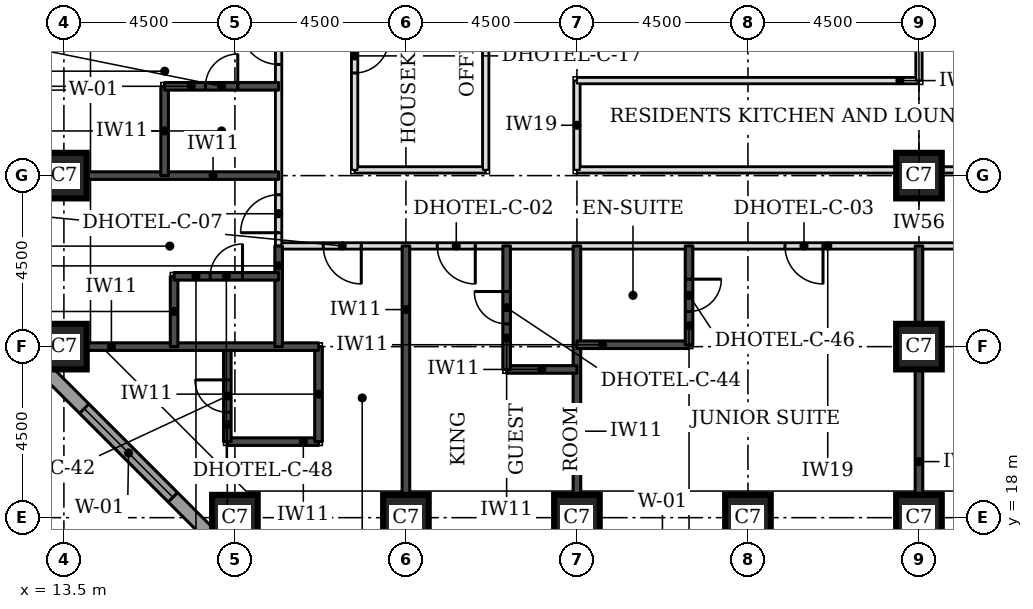
"""IFC4 building model, lengths in metres.
Left out: names, types, materials, properties, quantities, classifications, styles, units other than length and angle.
Written with IfcOpenShell. Run it as: python <this file> out.ifc"""

import sys

from ifc_helpers import new_model, si_unit, direction, frame, frame_2d, origin, origin_2d, place, context, subcontext, project, spatial, rectangle, extrude, element, fill, save


model = new_model("IFC4")
c1 = context("Model", 3, precision=1e-05, world=origin(), true_north=direction((0.0, 1.0)))
c2 = subcontext(c1, "Body", "Model", "MODEL_VIEW")
j1 = project(units=[si_unit("LENGTHUNIT", "METRE"), si_unit("PLANEANGLEUNIT", "RADIAN")], contexts=[c1])
p1 = place(None, origin())
s1 = spatial("IfcSite", under=j1, at=p1, CompositionType="ELEMENT")
p2 = place(p1, origin())
s2 = spatial("IfcBuilding", under=s1, at=p2, CompositionType="ELEMENT")
p3 = place(p2, frame((0.0, 0.0, 56.1)))
s3 = spatial("IfcBuildingStorey", under=s2, at=p3, CompositionType="ELEMENT", Elevation=56.1)
for number, where, z_axis, x_axis in (
    (1, (18.0, 18.0, 0.0), (0.0, 0.0, 1.0), (1.0, 0.0, 0.0)),
    (2, (22.5, 18.0, 0.0), (0.0, 0.0, 1.0), (1.0, 0.0, 0.0)),
    (3, (27.0, 18.0, 0.0), (0.0, 0.0, 1.0), (1.0, 0.0, 0.0)),
    (4, (31.5, 18.0, 0.0), (0.0, 0.0, 1.0), (1.0, 0.0, 0.0)),
    (5, (36.0, 18.0, 0.0), (0.0, 0.0, 1.0), (1.0, 0.0, 0.0)),
    (6, (13.5, 22.5, 0.0), (0.0, 0.0, 1.0), (1.0, 0.0, 0.0)),
    (7, (36.0, 22.5, 0.0), (0.0, 0.0, 1.0), (1.0, 0.0, 0.0)),
    (8, (13.5, 27.0, 0.0), (0.0, 0.0, 1.0), (1.0, 0.0, 0.0)),
    (9, (36.0, 27.0, 0.0), (0.0, 0.0, 1.0), (1.0, 0.0, 0.0)),
):
    element("IfcColumn", number, at=place(p3, frame(where, z_axis=z_axis, x_axis=x_axis)), inside=s3, PredefinedType="COLUMN", context=c2, shape_type="SweptSolid", body=[
        extrude(rectangle(XDim=1.2, YDim=1.2, at=origin_2d()), origin(), (0.0, 0.0, 1.0), 3.3),
    ])
p4 = place(p3, frame((12.674, 22.23, 0.0), z_axis=(0.0, 0.0, 1.0), x_axis=(0.707106781187, -0.707106781187, 0.0)))
e10 = element("IfcWall", 10, at=p4, inside=s3, PredefinedType="STANDARD", context=c2, shape_type="SweptSolid", body=[
    extrude(rectangle(XDim=7.151, YDim=0.35, at=frame_2d((3.576, 0.0))), origin(), (0.0, 0.0, 1.0), 3.055),
])
p5 = place(p4, frame((1.926, 0.0, 0.8)))
e11 = element("IfcOpeningElement", 11, at=p5, cuts=e10, PredefinedType="OPENING", context=c2, shape_type="SweptSolid", body=[
    extrude(rectangle(XDim=3.3, YDim=1.5, at=frame_2d((1.65, 0.75))), frame((0.0, 0.185, 0.0), z_axis=(0.0, -1.0, 0.0), x_axis=(1.0, 0.0, 0.0)), (0.0, 0.0, 1.0), 0.37),
])
p6 = place(p3, frame((19.15, 25.15, 0.0), z_axis=(0.0, 0.0, 1.0), x_axis=(1.0, 0.0, 0.0)))
e12 = element("IfcWall", 12, at=p6, inside=s3, PredefinedType="PARTITIONING", context=c2, shape_type="SweptSolid", body=[
    extrude(rectangle(XDim=33.7, YDim=0.15, at=frame_2d((16.85, 0.0))), origin(), (0.0, 0.0, 1.0), 3.08),
])
p7 = place(p6, frame((4.175, 0.0, 0.0)))
e13 = element("IfcOpeningElement", 13, at=p7, cuts=e12, PredefinedType="OPENING", context=c2, shape_type="SweptSolid", body=[
    extrude(rectangle(XDim=1.0, YDim=2.1, at=frame_2d((0.5, 1.05))), frame((0.0, 0.085, 0.0), z_axis=(0.0, -1.0, 0.0), x_axis=(1.0, 0.0, 0.0)), (0.0, 0.0, 1.0), 0.17),
])
p8 = place(p6, frame((13.325, 0.0, 0.0)))
e14 = element("IfcOpeningElement", 14, at=p8, cuts=e12, PredefinedType="OPENING", context=c2, shape_type="SweptSolid", body=[
    extrude(rectangle(XDim=1.0, YDim=2.1, at=frame_2d((0.5, 1.05))), frame((0.0, 0.085, 0.0), z_axis=(0.0, -1.0, 0.0), x_axis=(1.0, 0.0, 0.0)), (0.0, 0.0, 1.0), 0.17),
])
p9 = place(p6, frame((19.625, 0.0, 0.0)))
e15 = element("IfcOpeningElement", 15, at=p9, cuts=e12, PredefinedType="OPENING", context=c2, shape_type="SweptSolid", body=[
    extrude(rectangle(XDim=1.0, YDim=2.1, at=frame_2d((0.5, 1.05))), frame((0.0, 0.085, 0.0), z_axis=(0.0, -1.0, 0.0), x_axis=(1.0, 0.0, 0.0)), (0.0, 0.0, 1.0), 0.17),
])
p10 = place(p6, frame((28.775, 0.0, 0.0)))
e16 = element("IfcOpeningElement", 16, at=p10, cuts=e12, PredefinedType="OPENING", context=c2, shape_type="SweptSolid", body=[
    extrude(rectangle(XDim=1.0, YDim=2.1, at=frame_2d((0.5, 1.05))), frame((0.0, 0.085, 0.0), z_axis=(0.0, -1.0, 0.0), x_axis=(1.0, 0.0, 0.0)), (0.0, 0.0, 1.0), 0.17),
])
p11 = place(p6, frame((1.175, 0.0, 0.0)))
e17 = element("IfcOpeningElement", 17, at=p11, cuts=e12, PredefinedType="OPENING", context=c2, shape_type="SweptSolid", body=[
    extrude(rectangle(XDim=1.0, YDim=2.1, at=frame_2d((0.5, 1.05))), frame((0.0, 0.085, 0.0), z_axis=(0.0, -1.0, 0.0), x_axis=(1.0, 0.0, 0.0)), (0.0, 0.0, 1.0), 0.17),
])
p12 = place(p6, frame((31.525, 0.0, 0.0)))
e18 = element("IfcOpeningElement", 18, at=p12, cuts=e12, PredefinedType="OPENING", context=c2, shape_type="SweptSolid", body=[
    extrude(rectangle(XDim=1.0, YDim=2.1, at=frame_2d((0.5, 1.05))), frame((0.0, 0.085, 0.0), z_axis=(0.0, -1.0, 0.0), x_axis=(1.0, 0.0, 0.0)), (0.0, 0.0, 1.0), 0.17),
])
p13 = place(p3, frame((19.15, 25.15, 0.0), z_axis=(0.0, 0.0, 1.0), x_axis=(0.0, 1.0, 0.0)))
e19 = element("IfcWall", 19, at=p13, inside=s3, PredefinedType="PARTITIONING", context=c2, shape_type="SweptSolid", body=[
    extrude(rectangle(XDim=24.35, YDim=0.15, at=frame_2d((12.175, 0.0))), origin(), (0.0, 0.0, 1.0), 3.08),
])
p14 = place(p13, frame((0.347, 0.0, 0.0)))
e20 = element("IfcOpeningElement", 20, at=p14, cuts=e19, PredefinedType="OPENING", context=c2, shape_type="SweptSolid", body=[
    extrude(rectangle(XDim=1.0, YDim=2.1, at=frame_2d((0.5, 1.05))), frame((0.0, 0.085, 0.0), z_axis=(0.0, -1.0, 0.0), x_axis=(1.0, 0.0, 0.0)), (0.0, 0.0, 1.0), 0.17),
])
p15 = place(p13, frame((4.775, 0.0, 0.0)))
e21 = element("IfcOpeningElement", 21, at=p15, cuts=e19, PredefinedType="OPENING", context=c2, shape_type="SweptSolid", body=[
    extrude(rectangle(XDim=1.0, YDim=2.1, at=frame_2d((0.5, 1.05))), frame((0.0, 0.085, 0.0), z_axis=(0.0, -1.0, 0.0), x_axis=(1.0, 0.0, 0.0)), (0.0, 0.0, 1.0), 0.17),
])
p16 = place(p13, frame((7.175, 0.0, 0.0)))
e22 = element("IfcOpeningElement", 22, at=p16, cuts=e19, PredefinedType="OPENING", context=c2, shape_type="SweptSolid", body=[
    extrude(rectangle(XDim=1.0, YDim=2.1, at=frame_2d((0.5, 1.05))), frame((0.0, 0.085, 0.0), z_axis=(0.0, -1.0, 0.0), x_axis=(1.0, 0.0, 0.0)), (0.0, 0.0, 1.0), 0.17),
])
p17 = place(p13, frame((13.75, 0.0, 0.0)))
e23 = element("IfcOpeningElement", 23, at=p17, cuts=e19, PredefinedType="OPENING", context=c2, shape_type="SweptSolid", body=[
    extrude(rectangle(XDim=1.0, YDim=2.1, at=frame_2d((0.5, 1.05))), frame((0.0, 0.085, 0.0), z_axis=(0.0, -1.0, 0.0), x_axis=(1.0, 0.0, 0.0)), (0.0, 0.0, 1.0), 0.17),
])
p18 = place(p13, frame((16.175, 0.0, 0.0)))
e24 = element("IfcOpeningElement", 24, at=p18, cuts=e19, PredefinedType="OPENING", context=c2, shape_type="SweptSolid", body=[
    extrude(rectangle(XDim=1.0, YDim=2.1, at=frame_2d((0.5, 1.05))), frame((0.0, 0.085, 0.0), z_axis=(0.0, -1.0, 0.0), x_axis=(1.0, 0.0, 0.0)), (0.0, 0.0, 1.0), 0.17),
])
p19 = place(p13, frame((22.775, 0.0, 0.0)))
e25 = element("IfcOpeningElement", 25, at=p19, cuts=e19, PredefinedType="OPENING", context=c2, shape_type="SweptSolid", body=[
    extrude(rectangle(XDim=1.0, YDim=2.1, at=frame_2d((0.5, 1.05))), frame((0.0, 0.085, 0.0), z_axis=(0.0, -1.0, 0.0), x_axis=(1.0, 0.0, 0.0)), (0.0, 0.0, 1.0), 0.17),
])
p20 = place(p3, frame((21.15, 27.15, 0.0), z_axis=(0.0, 0.0, 1.0), x_axis=(1.0, 0.0, 0.0)))
e26 = element("IfcWall", 26, at=p20, inside=s3, PredefinedType="PARTITIONING", context=c2, shape_type="SweptSolid", body=[
    extrude(rectangle(XDim=3.45, YDim=0.15, at=frame_2d((1.725, 0.0))), origin(), (0.0, 0.0, 1.0), 3.08),
])
p21 = place(p3, frame((21.15, 27.15, 0.0), z_axis=(0.0, 0.0, 1.0), x_axis=(0.0, 1.0, 0.0)))
e27 = element("IfcWall", 27, at=p21, inside=s3, PredefinedType="PARTITIONING", context=c2, shape_type="SweptSolid", body=[
    extrude(rectangle(XDim=15.85, YDim=0.15, at=frame_2d((7.925, 0.0))), origin(), (0.0, 0.0, 1.0), 3.08),
])
p22 = place(p21, frame((2.55, 0.0, 0.0)))
e28 = element("IfcOpeningElement", 28, at=p22, cuts=e27, PredefinedType="OPENING", context=c2, shape_type="SweptSolid", body=[
    extrude(rectangle(XDim=0.9, YDim=2.1, at=frame_2d((0.45, 1.05))), frame((0.0, 0.085, 0.0), z_axis=(0.0, -1.0, 0.0), x_axis=(1.0, 0.0, 0.0)), (0.0, 0.0, 1.0), 0.17),
])
p23 = place(p21, frame((9.225, 0.0, 0.0)))
e29 = element("IfcOpeningElement", 29, at=p23, cuts=e27, PredefinedType="OPENING", context=c2, shape_type="SweptSolid", body=[
    extrude(rectangle(XDim=0.9, YDim=2.1, at=frame_2d((0.45, 1.05))), frame((0.0, 0.085, 0.0), z_axis=(0.0, -1.0, 0.0), x_axis=(1.0, 0.0, 0.0)), (0.0, 0.0, 1.0), 0.17),
])
p24 = place(p3, frame((24.6, 27.15, 0.0), z_axis=(0.0, 0.0, 1.0), x_axis=(0.0, 1.0, 0.0)))
e30 = element("IfcWall", 30, at=p24, inside=s3, PredefinedType="PARTITIONING", context=c2, shape_type="SweptSolid", body=[
    extrude(rectangle(XDim=13.35, YDim=0.15, at=frame_2d((6.675, 0.0))), origin(), (0.0, 0.0, 1.0), 3.08),
])
p25 = place(p3, frame((27.0, 27.15, 0.0), z_axis=(0.0, 0.0, 1.0), x_axis=(1.0, 0.0, 0.0)))
e31 = element("IfcWall", 31, at=p25, inside=s3, PredefinedType="PARTITIONING", context=c2, shape_type="SweptSolid", body=[
    extrude(rectangle(XDim=11.5, YDim=0.15, at=frame_2d((5.75, 0.0))), origin(), (0.0, 0.0, 1.0), 3.08),
])
p26 = place(p3, frame((27.0, 27.15, 0.0), z_axis=(0.0, 0.0, 1.0), x_axis=(0.0, 1.0, 0.0)))
e32 = element("IfcWall", 32, at=p26, inside=s3, PredefinedType="PARTITIONING", context=c2, shape_type="SweptSolid", body=[
    extrude(rectangle(XDim=2.35, YDim=0.15, at=frame_2d((1.175, 0.0))), origin(), (0.0, 0.0, 1.0), 3.08),
])
p27 = place(p3, frame((27.0, 29.5, 0.0), z_axis=(0.0, 0.0, 1.0), x_axis=(1.0, 0.0, 0.0)))
e33 = element("IfcWall", 33, at=p27, inside=s3, PredefinedType="PARTITIONING", context=c2, shape_type="SweptSolid", body=[
    extrude(rectangle(XDim=9.0, YDim=0.15, at=frame_2d((4.5, 0.0))), origin(), (0.0, 0.0, 1.0), 3.08),
])
p28 = place(p3, frame((36.0, 29.5, 0.0), z_axis=(0.0, 0.0, 1.0), x_axis=(0.0, 1.0, 0.0)))
e34 = element("IfcWall", 34, at=p28, inside=s3, PredefinedType="PARTITIONING", context=c2, shape_type="SweptSolid", body=[
    extrude(rectangle(XDim=1.95, YDim=0.15, at=frame_2d((0.975, 0.0))), origin(), (0.0, 0.0, 1.0), 2.33),
])
for number, where, z_axis, x_axis in (
    (35, (22.5, 18.6, 0.0), (0.0, 0.0, 1.0), (0.0, 1.0, 0.0)),
    (36, (27.0, 18.6, 0.0), (0.0, 0.0, 1.0), (0.0, 1.0, 0.0)),
    (37, (36.0, 18.6, 0.0), (0.0, 0.0, 1.0), (0.0, 1.0, 0.0)),
):
    element("IfcWall", number, at=place(p3, frame(where, z_axis=z_axis, x_axis=x_axis)), inside=s3, PredefinedType="SOLIDWALL", context=c2, shape_type="SweptSolid", body=[
        extrude(rectangle(XDim=6.55, YDim=0.2, at=frame_2d((3.275, 0.0))), origin(), (0.0, 0.0, 1.0), 3.08),
    ])
p29 = place(p3, frame((17.8, 20.0, 0.0), z_axis=(0.0, 0.0, 1.0), x_axis=(1.0, 0.0, 0.0)))
e38 = element("IfcWall", 38, at=p29, inside=s3, PredefinedType="SOLIDWALL", context=c2, shape_type="SweptSolid", body=[
    extrude(rectangle(XDim=2.4, YDim=0.2, at=frame_2d((1.2, 0.0))), origin(), (0.0, 0.0, 1.0), 3.08),
])
p30 = place(p3, frame((17.8, 20.0, 0.0), z_axis=(0.0, 0.0, 1.0), x_axis=(0.0, 1.0, 0.0)))
e39 = element("IfcWall", 39, at=p30, inside=s3, PredefinedType="SOLIDWALL", context=c2, shape_type="SweptSolid", body=[
    extrude(rectangle(XDim=2.5, YDim=0.2, at=frame_2d((1.25, 0.0))), origin(), (0.0, 0.0, 1.0), 3.08),
])
p31 = place(p30, frame((0.775, 0.0, 0.0)))
e40 = element("IfcOpeningElement", 40, at=p31, cuts=e39, PredefinedType="OPENING", context=c2, shape_type="SweptSolid", body=[
    extrude(rectangle(XDim=0.85, YDim=2.1, at=frame_2d((0.425, 1.05))), frame((0.0, 0.11, 0.0), z_axis=(0.0, -1.0, 0.0), x_axis=(1.0, 0.0, 0.0)), (0.0, 0.0, 1.0), 0.22),
])
p32 = place(p3, frame((20.2, 20.0, 0.0), z_axis=(0.0, 0.0, 1.0), x_axis=(0.0, 1.0, 0.0)))
e41 = element("IfcWall", 41, at=p32, inside=s3, PredefinedType="SOLIDWALL", context=c2, shape_type="SweptSolid", body=[
    extrude(rectangle(XDim=2.5, YDim=0.2, at=frame_2d((1.25, 0.0))), origin(), (0.0, 0.0, 1.0), 3.08),
])
p33 = place(p3, frame((25.15, 21.9, 0.0), z_axis=(0.0, 0.0, 1.0), x_axis=(1.0, 0.0, 0.0)))
e42 = element("IfcWall", 42, at=p33, inside=s3, PredefinedType="SOLIDWALL", context=c2, shape_type="SweptSolid", body=[
    extrude(rectangle(XDim=1.85, YDim=0.2, at=frame_2d((0.925, 0.0))), origin(), (0.0, 0.0, 1.0), 3.08),
])
p34 = place(p3, frame((25.15, 21.9, 0.0), z_axis=(0.0, 0.0, 1.0), x_axis=(0.0, 1.0, 0.0)))
e43 = element("IfcWall", 43, at=p34, inside=s3, PredefinedType="SOLIDWALL", context=c2, shape_type="SweptSolid", body=[
    extrude(rectangle(XDim=3.25, YDim=0.2, at=frame_2d((1.625, 0.0))), origin(), (0.0, 0.0, 1.0), 3.08),
])
p35 = place(p34, frame((1.2, 0.0, 0.0)))
e44 = element("IfcOpeningElement", 44, at=p35, cuts=e43, PredefinedType="OPENING", context=c2, shape_type="SweptSolid", body=[
    extrude(rectangle(XDim=0.85, YDim=2.1, at=frame_2d((0.425, 1.05))), frame((0.0, 0.11, 0.0), z_axis=(0.0, -1.0, 0.0), x_axis=(1.0, 0.0, 0.0)), (0.0, 0.0, 1.0), 0.22),
])
p36 = place(p3, frame((14.1, 22.5, 0.0), z_axis=(0.0, 0.0, 1.0), x_axis=(1.0, 0.0, 0.0)))
e45 = element("IfcWall", 45, at=p36, inside=s3, PredefinedType="SOLIDWALL", context=c2, shape_type="SweptSolid", body=[
    extrude(rectangle(XDim=6.1, YDim=0.2, at=frame_2d((3.05, 0.0))), origin(), (0.0, 0.0, 1.0), 3.08),
])
p37 = place(p3, frame((16.4, 22.5, 0.0), z_axis=(0.0, 0.0, 1.0), x_axis=(0.0, 1.0, 0.0)))
e46 = element("IfcWall", 46, at=p37, inside=s3, PredefinedType="SOLIDWALL", context=c2, shape_type="SweptSolid", body=[
    extrude(rectangle(XDim=1.85, YDim=0.2, at=frame_2d((0.925, 0.0))), origin(), (0.0, 0.0, 1.0), 3.08),
])
p38 = place(p3, frame((19.15, 22.5, 0.0), z_axis=(0.0, 0.0, 1.0), x_axis=(0.0, 1.0, 0.0)))
e47 = element("IfcWall", 47, at=p38, inside=s3, PredefinedType="SOLIDWALL", context=c2, shape_type="SweptSolid", body=[
    extrude(rectangle(XDim=2.65, YDim=0.2, at=frame_2d((1.325, 0.0))), origin(), (0.0, 0.0, 1.0), 3.08),
])
p39 = place(p3, frame((27.0, 22.55, 0.0), z_axis=(0.0, 0.0, 1.0), x_axis=(1.0, 0.0, 0.0)))
e48 = element("IfcWall", 48, at=p39, inside=s3, PredefinedType="SOLIDWALL", context=c2, shape_type="SweptSolid", body=[
    extrude(rectangle(XDim=2.95, YDim=0.2, at=frame_2d((1.475, 0.0))), origin(), (0.0, 0.0, 1.0), 3.08),
])
p40 = place(p3, frame((29.95, 22.55, 0.0), z_axis=(0.0, 0.0, 1.0), x_axis=(0.0, 1.0, 0.0)))
e49 = element("IfcWall", 49, at=p40, inside=s3, PredefinedType="SOLIDWALL", context=c2, shape_type="SweptSolid", body=[
    extrude(rectangle(XDim=2.6, YDim=0.2, at=frame_2d((1.3, 0.0))), origin(), (0.0, 0.0, 1.0), 3.08),
])
p41 = place(p40, frame((0.875, 0.0, 0.0)))
e50 = element("IfcOpeningElement", 50, at=p41, cuts=e49, PredefinedType="OPENING", context=c2, shape_type="SweptSolid", body=[
    extrude(rectangle(XDim=0.85, YDim=2.1, at=frame_2d((0.425, 1.05))), frame((0.0, 0.11, 0.0), z_axis=(0.0, -1.0, 0.0), x_axis=(1.0, 0.0, 0.0)), (0.0, 0.0, 1.0), 0.22),
])
p42 = place(p3, frame((16.4, 24.35, 0.0), z_axis=(0.0, 0.0, 1.0), x_axis=(1.0, 0.0, 0.0)))
e51 = element("IfcWall", 51, at=p42, inside=s3, PredefinedType="SOLIDWALL", context=c2, shape_type="SweptSolid", body=[
    extrude(rectangle(XDim=2.75, YDim=0.2, at=frame_2d((1.375, 0.0))), origin(), (0.0, 0.0, 1.0), 3.08),
])
p43 = place(p42, frame((0.95, 0.0, 0.0)))
e52 = element("IfcOpeningElement", 52, at=p43, cuts=e51, PredefinedType="OPENING", context=c2, shape_type="SweptSolid", body=[
    extrude(rectangle(XDim=0.85, YDim=2.1, at=frame_2d((0.425, 1.05))), frame((0.0, 0.11, 0.0), z_axis=(0.0, -1.0, 0.0), x_axis=(1.0, 0.0, 0.0)), (0.0, 0.0, 1.0), 0.22),
])
p44 = place(p3, frame((14.1, 27.0, 0.0), z_axis=(0.0, 0.0, 1.0), x_axis=(1.0, 0.0, 0.0)))
e53 = element("IfcWall", 53, at=p44, inside=s3, PredefinedType="SOLIDWALL", context=c2, shape_type="SweptSolid", body=[
    extrude(rectangle(XDim=5.05, YDim=0.2, at=frame_2d((2.525, 0.0))), origin(), (0.0, 0.0, 1.0), 3.08),
])
p45 = place(p3, frame((16.15, 27.0, 0.0), z_axis=(0.0, 0.0, 1.0), x_axis=(0.0, 1.0, 0.0)))
e54 = element("IfcWall", 54, at=p45, inside=s3, PredefinedType="SOLIDWALL", context=c2, shape_type="SweptSolid", body=[
    extrude(rectangle(XDim=2.35, YDim=0.2, at=frame_2d((1.175, 0.0))), origin(), (0.0, 0.0, 1.0), 3.08),
])
p46 = place(p3, frame((16.15, 29.35, 0.0), z_axis=(0.0, 0.0, 1.0), x_axis=(1.0, 0.0, 0.0)))
e55 = element("IfcWall", 55, at=p46, inside=s3, PredefinedType="SOLIDWALL", context=c2, shape_type="SweptSolid", body=[
    extrude(rectangle(XDim=3.0, YDim=0.2, at=frame_2d((1.5, 0.0))), origin(), (0.0, 0.0, 1.0), 3.08),
])
p47 = place(p46, frame((1.075, 0.0, 0.0)))
e56 = element("IfcOpeningElement", 56, at=p47, cuts=e55, PredefinedType="OPENING", context=c2, shape_type="SweptSolid", body=[
    extrude(rectangle(XDim=0.85, YDim=2.1, at=frame_2d((0.425, 1.05))), frame((0.0, 0.11, 0.0), z_axis=(0.0, -1.0, 0.0), x_axis=(1.0, 0.0, 0.0)), (0.0, 0.0, 1.0), 0.22),
])
p48 = place(p5, origin())
e57 = element("IfcWindow", 57, at=p48, inside=s3, PartitioningType="SINGLE_PANEL", PredefinedType="WINDOW", context=c2, shape_type="SweptSolid", body=[
    extrude(rectangle(XDim=3.3, YDim=1.5, at=frame_2d((1.65, 0.75))), frame((0.0, 0.085, 0.0), z_axis=(0.0, -1.0, 0.0), x_axis=(1.0, 0.0, 0.0)), (0.0, 0.0, 1.0), 0.06),
])
fill(e11, e57)
p49 = place(p7, frame((1.0, 0.0, 0.0), z_axis=(0.0, 0.0, 1.0), x_axis=(-1.0, 0.0, 0.0)))
e58 = element("IfcDoor", 58, at=p49, inside=s3, OperationType="SINGLE_SWING_LEFT", PredefinedType="DOOR", context=c2, shape_type="SweptSolid", body=[
    extrude(rectangle(XDim=1.0, YDim=2.1, at=frame_2d((0.5, 1.05))), frame((0.0, 0.025, 0.0), z_axis=(0.0, -1.0, 0.0), x_axis=(1.0, 0.0, 0.0)), (0.0, 0.0, 1.0), 0.05),
])
fill(e13, e58)
p50 = place(p35, origin())
e59 = element("IfcDoor", 59, at=p50, inside=s3, OperationType="SINGLE_SWING_RIGHT", PredefinedType="DOOR", context=c2, shape_type="SweptSolid", body=[
    extrude(rectangle(XDim=0.85, YDim=2.1, at=frame_2d((0.425, 1.05))), frame((0.0, 0.025, 0.0), z_axis=(0.0, -1.0, 0.0), x_axis=(1.0, 0.0, 0.0)), (0.0, 0.0, 1.0), 0.05),
])
fill(e44, e59)
p51 = place(p8, frame((1.0, 0.0, 0.0), z_axis=(0.0, 0.0, 1.0), x_axis=(-1.0, 0.0, 0.0)))
e60 = element("IfcDoor", 60, at=p51, inside=s3, OperationType="SINGLE_SWING_LEFT", PredefinedType="DOOR", context=c2, shape_type="SweptSolid", body=[
    extrude(rectangle(XDim=1.0, YDim=2.1, at=frame_2d((0.5, 1.05))), frame((0.0, 0.025, 0.0), z_axis=(0.0, -1.0, 0.0), x_axis=(1.0, 0.0, 0.0)), (0.0, 0.0, 1.0), 0.05),
])
fill(e14, e60)
p52 = place(p41, frame((0.85, 0.0, 0.0), z_axis=(0.0, 0.0, 1.0), x_axis=(-1.0, 0.0, 0.0)))
e61 = element("IfcDoor", 61, at=p52, inside=s3, OperationType="SINGLE_SWING_LEFT", PredefinedType="DOOR", context=c2, shape_type="SweptSolid", body=[
    extrude(rectangle(XDim=0.85, YDim=2.1, at=frame_2d((0.425, 1.05))), frame((0.0, 0.025, 0.0), z_axis=(0.0, -1.0, 0.0), x_axis=(1.0, 0.0, 0.0)), (0.0, 0.0, 1.0), 0.05),
])
fill(e50, e61)
p53 = place(p14, origin())
e62 = element("IfcDoor", 62, at=p53, inside=s3, OperationType="SINGLE_SWING_LEFT", PredefinedType="DOOR", context=c2, shape_type="SweptSolid", body=[
    extrude(rectangle(XDim=1.0, YDim=2.1, at=frame_2d((0.5, 1.05))), frame((0.0, 0.025, 0.0), z_axis=(0.0, -1.0, 0.0), x_axis=(1.0, 0.0, 0.0)), (0.0, 0.0, 1.0), 0.05),
])
fill(e20, e62)
p54 = place(p43, origin())
e63 = element("IfcDoor", 63, at=p54, inside=s3, OperationType="SINGLE_SWING_RIGHT", PredefinedType="DOOR", context=c2, shape_type="SweptSolid", body=[
    extrude(rectangle(XDim=0.85, YDim=2.1, at=frame_2d((0.425, 1.05))), frame((0.0, 0.025, 0.0), z_axis=(0.0, -1.0, 0.0), x_axis=(1.0, 0.0, 0.0)), (0.0, 0.0, 1.0), 0.05),
])
fill(e52, e63)
p55 = place(p15, origin())
e64 = element("IfcDoor", 64, at=p55, inside=s3, OperationType="SINGLE_SWING_RIGHT", PredefinedType="DOOR", context=c2, shape_type="SweptSolid", body=[
    extrude(rectangle(XDim=1.0, YDim=2.1, at=frame_2d((0.5, 1.05))), frame((0.0, 0.025, 0.0), z_axis=(0.0, -1.0, 0.0), x_axis=(1.0, 0.0, 0.0)), (0.0, 0.0, 1.0), 0.05),
])
fill(e21, e64)
p56 = place(p47, origin())
e65 = element("IfcDoor", 65, at=p56, inside=s3, OperationType="SINGLE_SWING_RIGHT", PredefinedType="DOOR", context=c2, shape_type="SweptSolid", body=[
    extrude(rectangle(XDim=0.85, YDim=2.1, at=frame_2d((0.425, 1.05))), frame((0.0, 0.025, 0.0), z_axis=(0.0, -1.0, 0.0), x_axis=(1.0, 0.0, 0.0)), (0.0, 0.0, 1.0), 0.05),
])
fill(e56, e65)
p57 = place(p11, frame((1.0, 0.0, 0.0), z_axis=(0.0, 0.0, 1.0), x_axis=(-1.0, 0.0, 0.0)))
e66 = element("IfcDoor", 66, at=p57, inside=s3, OperationType="SINGLE_SWING_LEFT", PredefinedType="DOOR", context=c2, shape_type="SweptSolid", body=[
    extrude(rectangle(XDim=1.0, YDim=2.1, at=frame_2d((0.5, 1.05))), frame((0.0, 0.025, 0.0), z_axis=(0.0, -1.0, 0.0), x_axis=(1.0, 0.0, 0.0)), (0.0, 0.0, 1.0), 0.05),
])
fill(e17, e66)
p58 = place(p31, origin())
e67 = element("IfcDoor", 67, at=p58, inside=s3, OperationType="SINGLE_SWING_RIGHT", PredefinedType="DOOR", context=c2, shape_type="SweptSolid", body=[
    extrude(rectangle(XDim=0.85, YDim=2.1, at=frame_2d((0.425, 1.05))), frame((0.0, 0.025, 0.0), z_axis=(0.0, -1.0, 0.0), x_axis=(1.0, 0.0, 0.0)), (0.0, 0.0, 1.0), 0.05),
])
fill(e40, e67)
p59 = place(p22, frame((0.9, 0.0, 0.0), z_axis=(0.0, 0.0, 1.0), x_axis=(-1.0, 0.0, 0.0)))
e68 = element("IfcDoor", 68, at=p59, inside=s3, OperationType="SINGLE_SWING_LEFT", PredefinedType="DOOR", context=c2, shape_type="SweptSolid", body=[
    extrude(rectangle(XDim=0.9, YDim=2.1, at=frame_2d((0.45, 1.05))), frame((0.0, 0.025, 0.0), z_axis=(0.0, -1.0, 0.0), x_axis=(1.0, 0.0, 0.0)), (0.0, 0.0, 1.0), 0.05),
])
fill(e28, e68)
save(model, sys.argv[1])
